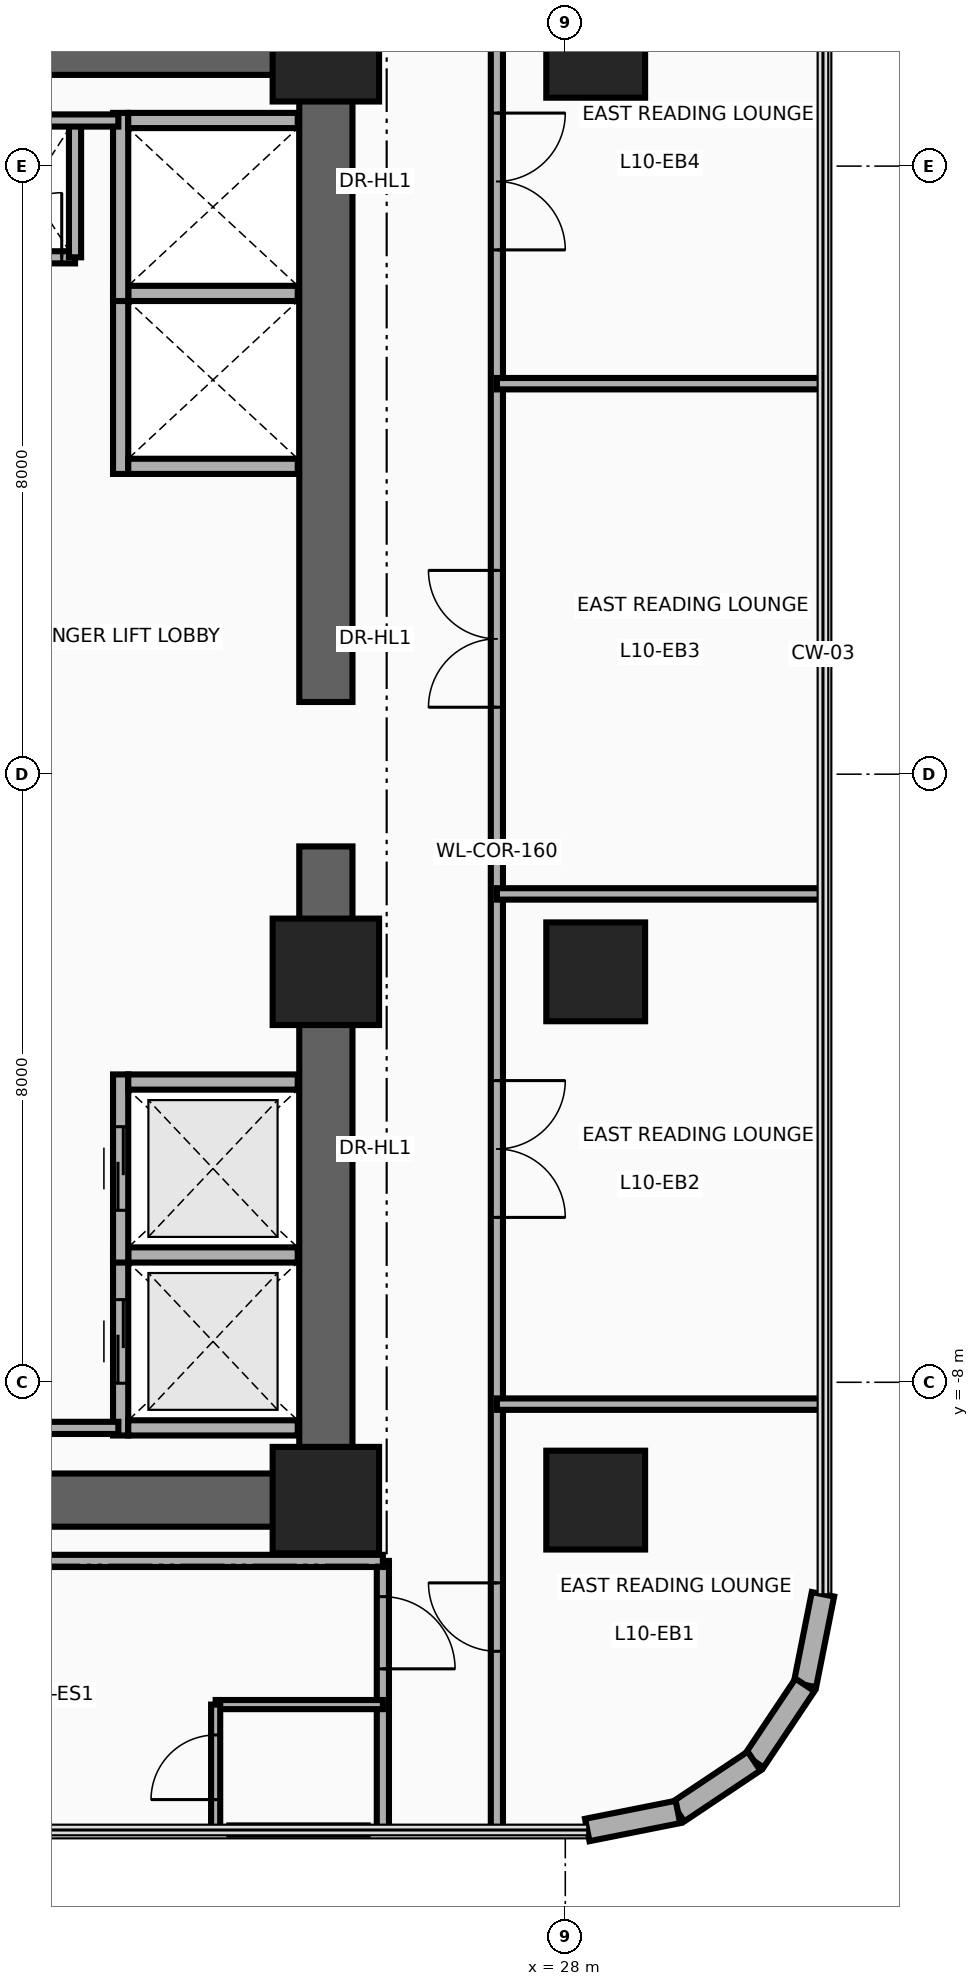
"""IFC4 building model, lengths in metres.
Left out: names, types, materials, properties, quantities, classifications, styles, units other than length and angle.
Written with IfcOpenShell. Run it as: python <this file> out.ifc"""

import sys

from ifc_helpers import new_model, si_unit, direction, frame, frame_2d, origin, origin_2d, place, context, subcontext, project, spatial, rectangle, circle, extrude, source, transform, mapped, element, fill, save


model = new_model("IFC4")
c1 = context("Model", 3, precision=1e-05, world=origin(), true_north=direction((0.0, 1.0)))
c2 = subcontext(c1, "Body", "Model", "MODEL_VIEW")
j1 = project(units=[si_unit("LENGTHUNIT", "METRE"), si_unit("PLANEANGLEUNIT", "RADIAN")], contexts=[c1])
p1 = place(None, origin())
s1 = spatial("IfcSite", under=j1, at=p1, CompositionType="ELEMENT")
p2 = place(p1, origin())
s2 = spatial("IfcBuilding", under=s1, at=p2, CompositionType="ELEMENT")
p3 = place(p2, frame((0.0, 0.0, 44.5)))
s3 = spatial("IfcBuildingStorey", under=s2, at=p3, CompositionType="ELEMENT", Elevation=44.5)
for number, where, z_axis, x_axis in (
    (1, (24.85, -9.9, 0.0), (0.0, 0.0, 1.0), (0.0, 1.0, 0.0)),
    (2, (24.85, 0.95, 0.0), (0.0, 0.0, 1.0), (0.0, 1.0, 0.0)),
):
    element("IfcWall", number, at=place(p3, frame(where, z_axis=z_axis, x_axis=x_axis)), inside=s3, PredefinedType="SHEAR", context=c2, shape_type="SweptSolid", body=[
        extrude(rectangle(XDim=8.95, YDim=0.7, at=frame_2d((4.475, 0.0))), origin(), (0.0, 0.0, 1.0), 3.46),
    ])
for number, where, z_axis, x_axis in (
    (3, (15.85, 9.55, 0.0), (0.0, 0.0, 1.0), (1.0, 0.0, 0.0)),
    (4, (15.85, -9.55, 0.0), (0.0, 0.0, 1.0), (1.0, 0.0, 0.0)),
):
    element("IfcWall", number, at=place(p3, frame(where, z_axis=z_axis, x_axis=x_axis)), inside=s3, PredefinedType="SHEAR", context=c2, shape_type="SweptSolid", body=[
        extrude(rectangle(XDim=9.0, YDim=0.7, at=frame_2d((4.5, 0.0))), origin(), (0.0, 0.0, 1.0), 3.46),
    ])
m1 = source(origin(), c2, "Body", "SweptSolid", [
    extrude(rectangle(XDim=1.4, YDim=1.4, at=origin_2d()), origin(), (0.0, 0.0, 1.0), 3.7),
])
p4 = place(p3, frame((24.85, -9.55, 0.0), z_axis=(0.0, 0.0, 1.0), x_axis=(1.0, 0.0, 0.0)))
e5 = element("IfcColumn", 5, at=p4, inside=s3, PredefinedType="COLUMN", context=c2, shape_type="MappedRepresentation", body=[
    mapped(m1, transform((0.0, 0.0, 0.0), x_axis=(1.0, 0.0, 0.0), y_axis=(0.0, 1.0, 0.0), z_axis=(0.0, 0.0, 1.0), scale=1.0)),
])
m2 = source(origin(), c2, "Body", "SweptSolid", [
    extrude(circle(Radius=0.65, at=origin_2d()), origin(), (0.0, 0.0, 1.0), 3.7),
])
p5 = place(p3, frame((28.4, -9.55, 0.0), z_axis=(0.0, 0.0, 1.0), x_axis=(1.0, 0.0, 0.0)))
e6 = element("IfcColumn", 6, at=p5, inside=s3, PredefinedType="COLUMN", context=c2, shape_type="MappedRepresentation", body=[
    mapped(m2, transform((0.0, 0.0, 0.0), x_axis=(1.0, 0.0, 0.0), y_axis=(0.0, 1.0, 0.0), z_axis=(0.0, 0.0, 1.0), scale=1.0)),
])
p6 = place(p3, frame((24.85, -2.6, 0.0), z_axis=(0.0, 0.0, 1.0), x_axis=(1.0, 0.0, 0.0)))
e7 = element("IfcColumn", 7, at=p6, inside=s3, PredefinedType="COLUMN", context=c2, shape_type="MappedRepresentation", body=[
    mapped(m1, transform((0.0, 0.0, 0.0), x_axis=(1.0, 0.0, 0.0), y_axis=(0.0, 1.0, 0.0), z_axis=(0.0, 0.0, 1.0), scale=1.0)),
])
p7 = place(p3, frame((28.4, -2.6, 0.0), z_axis=(0.0, 0.0, 1.0), x_axis=(1.0, 0.0, 0.0)))
e8 = element("IfcColumn", 8, at=p7, inside=s3, PredefinedType="COLUMN", context=c2, shape_type="MappedRepresentation", body=[
    mapped(m2, transform((0.0, 0.0, 0.0), x_axis=(1.0, 0.0, 0.0), y_axis=(0.0, 1.0, 0.0), z_axis=(0.0, 0.0, 1.0), scale=1.0)),
])
p8 = place(p3, frame((24.85, 9.55, 0.0), z_axis=(0.0, 0.0, 1.0), x_axis=(1.0, 0.0, 0.0)))
e9 = element("IfcColumn", 9, at=p8, inside=s3, PredefinedType="COLUMN", context=c2, shape_type="MappedRepresentation", body=[
    mapped(m1, transform((0.0, 0.0, 0.0), x_axis=(1.0, 0.0, 0.0), y_axis=(0.0, 1.0, 0.0), z_axis=(0.0, 0.0, 1.0), scale=1.0)),
])
p9 = place(p3, frame((28.4, 9.55, 0.0), z_axis=(0.0, 0.0, 1.0), x_axis=(1.0, 0.0, 0.0)))
e10 = element("IfcColumn", 10, at=p9, inside=s3, PredefinedType="COLUMN", context=c2, shape_type="MappedRepresentation", body=[
    mapped(m2, transform((0.0, 0.0, 0.0), x_axis=(1.0, 0.0, 0.0), y_axis=(0.0, 1.0, 0.0), z_axis=(0.0, 0.0, 1.0), scale=1.0)),
])
p10 = place(p3, frame((31.39, -10.789, 0.0), z_axis=(0.0, 0.0, 1.0), x_axis=(-0.194996050505, -0.980804027463, 0.0)))
e11 = element("IfcWall", 11, at=p10, inside=s3, PredefinedType="SOLIDWALL", context=c2, shape_type="SweptSolid", body=[
    extrude(rectangle(XDim=1.216, YDim=0.3, at=frame_2d((0.608, 0.0))), origin(), (0.0, 0.0, 1.0), 3.46),
])
for number, where, z_axis, x_axis in (
    (12, (31.153, -11.982, 0.0), (0.0, 0.0, 1.0), (-0.556, -0.831, 0.0)),
    (13, (30.483, -12.983, 0.0), (0.0, 0.0, 1.0), (-0.831, -0.556, 0.0)),
):
    element("IfcWall", number, at=place(p3, frame(where, z_axis=z_axis, x_axis=x_axis)), inside=s3, PredefinedType="SOLIDWALL", context=c2, shape_type="SweptSolid", body=[
        extrude(rectangle(XDim=1.205, YDim=0.3, at=frame_2d((0.603, 0.0))), origin(), (0.0, 0.0, 1.0), 3.46),
    ])
p11 = place(p3, frame((29.482, -13.653, 0.0), z_axis=(0.0, 0.0, 1.0), x_axis=(-0.980804027463, -0.194996050505, 0.0)))
e14 = element("IfcWall", 14, at=p11, inside=s3, PredefinedType="SOLIDWALL", context=c2, shape_type="SweptSolid", body=[
    extrude(rectangle(XDim=1.216, YDim=0.3, at=frame_2d((0.608, 0.0))), origin(), (0.0, 0.0, 1.0), 3.46),
])
p12 = place(p3, frame((22.15, -8.7, 0.0), z_axis=(0.0, 0.0, 1.0), x_axis=(0.0, 1.0, 0.0)))
e15 = element("IfcWall", 15, at=p12, inside=s3, PredefinedType="MOVABLE", context=c2, shape_type="SweptSolid", body=[
    extrude(rectangle(XDim=2.475, YDim=0.2, at=frame_2d((1.237, 0.0))), origin(), (0.0, 0.0, 1.0), 3.46),
])
p13 = place(p12, frame((0.688, 0.0, 0.0)))
e16 = element("IfcOpeningElement", 16, at=p13, cuts=e15, PredefinedType="OPENING", context=c2, shape_type="SweptSolid", body=[
    extrude(rectangle(XDim=1.1, YDim=2.1, at=frame_2d((0.55, 1.05))), frame((0.0, 0.115, 0.0), z_axis=(0.0, -1.0, 0.0), x_axis=(1.0, 0.0, 0.0)), (0.0, 0.0, 1.0), 0.23),
])
for number, where, z_axis, x_axis in (
    (17, (22.25, -8.6, 0.0), (0.0, 0.0, 1.0), (1.0, 0.0, 0.0)),
    (18, (22.25, -6.325, 0.0), (0.0, 0.0, 1.0), (1.0, 0.0, 0.0)),
):
    element("IfcWall", number, at=place(p3, frame(where, z_axis=z_axis, x_axis=x_axis)), inside=s3, PredefinedType="MOVABLE", context=c2, shape_type="SweptSolid", body=[
        extrude(rectangle(XDim=2.23, YDim=0.2, at=frame_2d((1.115, 0.0))), origin(), (0.0, 0.0, 1.0), 3.46),
    ])
p14 = place(p3, frame((22.15, -6.425, 0.0), z_axis=(0.0, 0.0, 1.0), x_axis=(0.0, 1.0, 0.0)))
e19 = element("IfcWall", 19, at=p14, inside=s3, PredefinedType="MOVABLE", context=c2, shape_type="SweptSolid", body=[
    extrude(rectangle(XDim=2.475, YDim=0.2, at=frame_2d((1.238, 0.0))), origin(), (0.0, 0.0, 1.0), 3.46),
])
p15 = place(p14, frame((0.688, 0.0, 0.0)))
e20 = element("IfcOpeningElement", 20, at=p15, cuts=e19, PredefinedType="OPENING", context=c2, shape_type="SweptSolid", body=[
    extrude(rectangle(XDim=1.1, YDim=2.1, at=frame_2d((0.55, 1.05))), frame((0.0, 0.115, 0.0), z_axis=(0.0, -1.0, 0.0), x_axis=(1.0, 0.0, 0.0)), (0.0, 0.0, 1.0), 0.23),
])
p16 = place(p3, frame((22.25, -4.05, 0.0), z_axis=(0.0, 0.0, 1.0), x_axis=(1.0, 0.0, 0.0)))
e21 = element("IfcWall", 21, at=p16, inside=s3, PredefinedType="MOVABLE", context=c2, shape_type="SweptSolid", body=[
    extrude(rectangle(XDim=2.23, YDim=0.2, at=frame_2d((1.115, 0.0))), origin(), (0.0, 0.0, 1.0), 3.46),
])
p17 = place(p3, frame((22.15, 3.95, 0.0), z_axis=(0.0, 0.0, 1.0), x_axis=(0.0, 1.0, 0.0)))
e22 = element("IfcWall", 22, at=p17, inside=s3, PredefinedType="MOVABLE", context=c2, shape_type="SweptSolid", body=[
    extrude(rectangle(XDim=2.475, YDim=0.2, at=frame_2d((1.238, 0.0))), origin(), (0.0, 0.0, 1.0), 3.46),
])
for number, where, z_axis, x_axis in (
    (23, (22.25, 4.05, 0.0), (0.0, 0.0, 1.0), (1.0, 0.0, 0.0)),
    (24, (22.25, 6.325, 0.0), (0.0, 0.0, 1.0), (1.0, 0.0, 0.0)),
):
    element("IfcWall", number, at=place(p3, frame(where, z_axis=z_axis, x_axis=x_axis)), inside=s3, PredefinedType="MOVABLE", context=c2, shape_type="SweptSolid", body=[
        extrude(rectangle(XDim=2.23, YDim=0.2, at=frame_2d((1.115, 0.0))), origin(), (0.0, 0.0, 1.0), 2.245),
    ])
p18 = place(p3, frame((22.15, 6.225, 0.0), z_axis=(0.0, 0.0, 1.0), x_axis=(0.0, 1.0, 0.0)))
e25 = element("IfcWall", 25, at=p18, inside=s3, PredefinedType="MOVABLE", context=c2, shape_type="SweptSolid", body=[
    extrude(rectangle(XDim=2.475, YDim=0.2, at=frame_2d((1.237, 0.0))), origin(), (0.0, 0.0, 1.0), 3.46),
])
p19 = place(p3, frame((22.25, 8.6, 0.0), z_axis=(0.0, 0.0, 1.0), x_axis=(1.0, 0.0, 0.0)))
e26 = element("IfcWall", 26, at=p19, inside=s3, PredefinedType="MOVABLE", context=c2, shape_type="SweptSolid", body=[
    extrude(rectangle(XDim=2.23, YDim=0.2, at=frame_2d((1.115, 0.0))), origin(), (0.0, 0.0, 1.0), 2.245),
])
p20 = place(p3, frame((20.35, 6.8, 0.0), z_axis=(0.0, 0.0, 1.0), x_axis=(1.0, 0.0, 0.0)))
e27 = element("IfcWall", 27, at=p20, inside=s3, PredefinedType="PARTITIONING", context=c2, shape_type="SweptSolid", body=[
    extrude(rectangle(XDim=1.2, YDim=0.16, at=frame_2d((0.6, 0.0))), origin(), (0.0, 0.0, 1.0), 3.46),
])
p21 = place(p20, frame((0.175, 0.0, 0.0)))
e28 = element("IfcOpeningElement", 28, at=p21, cuts=e27, PredefinedType="OPENING", context=c2, shape_type="SweptSolid", body=[
    extrude(rectangle(XDim=0.85, YDim=2.05, at=frame_2d((0.425, 1.025))), frame((0.0, 0.095, 0.0), z_axis=(0.0, -1.0, 0.0), x_axis=(1.0, 0.0, 0.0)), (0.0, 0.0, 1.0), 0.19),
])
p22 = place(p3, frame((21.55, 6.8, 0.0), z_axis=(0.0, 0.0, 1.0), x_axis=(0.0, 1.0, 0.0)))
e29 = element("IfcWall", 29, at=p22, inside=s3, PredefinedType="PARTITIONING", context=c2, shape_type="SweptSolid", body=[
    extrude(rectangle(XDim=1.8, YDim=0.16, at=frame_2d((0.9, 0.0))), origin(), (0.0, 0.0, 1.0), 3.46),
])
for number, where, z_axis, x_axis in (
    (30, (20.3, -8.6, 0.0), (0.0, 0.0, 1.0), (1.0, 0.0, 0.0)),
    (31, (20.3, 8.6, 0.0), (0.0, 0.0, 1.0), (1.0, 0.0, 0.0)),
):
    element("IfcWall", number, at=place(p3, frame(where, z_axis=z_axis, x_axis=x_axis)), inside=s3, PredefinedType="PARTITIONING", context=c2, shape_type="SweptSolid", body=[
        extrude(rectangle(XDim=1.82, YDim=0.16, at=frame_2d((0.91, 0.0))), origin(), (0.0, 0.0, 1.0), 3.46),
    ])
p23 = place(p3, frame((25.6, -13.89, 0.0), z_axis=(0.0, 0.0, 1.0), x_axis=(0.0, 1.0, 0.0)))
e32 = element("IfcWall", 32, at=p23, inside=s3, PredefinedType="PARTITIONING", context=c2, shape_type="SweptSolid", body=[
    extrude(rectangle(XDim=3.54, YDim=0.16, at=frame_2d((1.77, 0.0))), origin(), (0.0, 0.0, 1.0), 3.46),
])
p24 = place(p23, frame((2.12, 0.0, 0.0)))
e33 = element("IfcOpeningElement", 33, at=p24, cuts=e32, PredefinedType="OPENING", context=c2, shape_type="SweptSolid", body=[
    extrude(rectangle(XDim=0.95, YDim=2.15, at=frame_2d((0.475, 1.075))), frame((0.0, 0.095, 0.0), z_axis=(0.0, -1.0, 0.0), x_axis=(1.0, 0.0, 0.0)), (0.0, 0.0, 1.0), 0.19),
])
p25 = place(p3, frame((13.41, -10.35, 0.0), z_axis=(0.0, 0.0, 1.0), x_axis=(1.0, 0.0, 0.0)))
e34 = element("IfcWall", 34, at=p25, inside=s3, PredefinedType="PARTITIONING", context=c2, shape_type="SweptSolid", body=[
    extrude(rectangle(XDim=12.19, YDim=0.16, at=frame_2d((6.095, 0.0))), origin(), (0.0, 0.0, 1.0), 3.46),
])
p26 = place(p3, frame((23.4, -12.24, 0.0), z_axis=(0.0, 0.0, 1.0), x_axis=(1.0, 0.0, 0.0)))
e35 = element("IfcWall", 35, at=p26, inside=s3, PredefinedType="PARTITIONING", context=c2, shape_type="SweptSolid", body=[
    extrude(rectangle(XDim=2.2, YDim=0.12, at=frame_2d((1.1, 0.0))), origin(), (0.0, 0.0, 1.0), 3.46),
])
p27 = place(p3, frame((23.4, -13.89, 0.0), z_axis=(0.0, 0.0, 1.0), x_axis=(0.0, 1.0, 0.0)))
e36 = element("IfcWall", 36, at=p27, inside=s3, PredefinedType="PARTITIONING", context=c2, shape_type="SweptSolid", body=[
    extrude(rectangle(XDim=1.65, YDim=0.12, at=frame_2d((0.825, 0.0))), origin(), (0.0, 0.0, 1.0), 3.46),
])
p28 = place(p27, frame((0.4, 0.0, 0.0)))
e37 = element("IfcOpeningElement", 37, at=p28, cuts=e36, PredefinedType="OPENING", context=c2, shape_type="SweptSolid", body=[
    extrude(rectangle(XDim=0.85, YDim=2.1, at=frame_2d((0.425, 1.05))), frame((0.0, 0.075, 0.0), z_axis=(0.0, -1.0, 0.0), x_axis=(1.0, 0.0, 0.0)), (0.0, 0.0, 1.0), 0.15),
])
p29 = place(p3, frame((23.58, -13.89, 0.0), z_axis=(0.0, 0.0, 1.0), x_axis=(1.0, 0.0, 0.0)))
e38 = element("IfcWall", 38, at=p29, inside=s3, PredefinedType="PARTITIONING", context=c2, shape_type="SweptSolid", body=[
    extrude(rectangle(XDim=1.82, YDim=0.12, at=frame_2d((0.91, 0.0))), origin(), (0.0, 0.0, 1.0), 3.46),
])
p30 = place(p3, frame((27.1, -13.89, 0.0), z_axis=(0.0, 0.0, 1.0), x_axis=(0.0, 1.0, 0.0)))
e39 = element("IfcWall", 39, at=p30, inside=s3, PredefinedType="PARTITIONING", context=c2, shape_type="SweptSolid", body=[
    extrude(rectangle(XDim=25.74, YDim=0.16, at=frame_2d((12.87, 0.0))), origin(), (0.0, 0.0, 1.0), 2.583),
])
p31 = place(p30, frame((2.351, 0.0, 0.0)))
e40 = element("IfcOpeningElement", 40, at=p31, cuts=e39, PredefinedType="OPENING", context=c2, shape_type="SweptSolid", body=[
    extrude(rectangle(XDim=0.9, YDim=2.1, at=frame_2d((0.45, 1.05))), frame((0.0, 0.095, 0.0), z_axis=(0.0, -1.0, 0.0), x_axis=(1.0, 0.0, 0.0)), (0.0, 0.0, 1.0), 0.19),
])
p32 = place(p30, frame((8.059, 0.0, 0.0)))
e41 = element("IfcOpeningElement", 41, at=p32, cuts=e39, PredefinedType="OPENING", context=c2, shape_type="SweptSolid", body=[
    extrude(rectangle(XDim=1.8, YDim=2.15, at=frame_2d((0.9, 1.075))), frame((0.0, 0.095, 0.0), z_axis=(0.0, -1.0, 0.0), x_axis=(1.0, 0.0, 0.0)), (0.0, 0.0, 1.0), 0.19),
])
p33 = place(p30, frame((14.771, 0.0, 0.0)))
e42 = element("IfcOpeningElement", 42, at=p33, cuts=e39, PredefinedType="OPENING", context=c2, shape_type="SweptSolid", body=[
    extrude(rectangle(XDim=1.8, YDim=2.15, at=frame_2d((0.9, 1.075))), frame((0.0, 0.095, 0.0), z_axis=(0.0, -1.0, 0.0), x_axis=(1.0, 0.0, 0.0)), (0.0, 0.0, 1.0), 0.19),
])
p34 = place(p30, frame((20.788, 0.0, 0.0)))
e43 = element("IfcOpeningElement", 43, at=p34, cuts=e39, PredefinedType="OPENING", context=c2, shape_type="SweptSolid", body=[
    extrude(rectangle(XDim=1.8, YDim=2.15, at=frame_2d((0.9, 1.075))), frame((0.0, 0.095, 0.0), z_axis=(0.0, -1.0, 0.0), x_axis=(1.0, 0.0, 0.0)), (0.0, 0.0, 1.0), 0.19),
])
for number, where, z_axis, x_axis in (
    (44, (27.1, -8.288, 0.0), (0.0, 0.0, 1.0), (1.0, 0.0, 0.0)),
    (45, (27.1, -1.575, 0.0), (0.0, 0.0, 1.0), (1.0, 0.0, 0.0)),
    (46, (27.1, 5.137, 0.0), (0.0, 0.0, 1.0), (1.0, 0.0, 0.0)),
):
    element("IfcWall", number, at=place(p3, frame(where, z_axis=z_axis, x_axis=x_axis)), inside=s3, PredefinedType="PARTITIONING", context=c2, shape_type="SweptSolid", body=[
        extrude(rectangle(XDim=4.29, YDim=0.15, at=frame_2d((2.145, 0.0))), origin(), (0.0, 0.0, 1.0), 2.896),
    ])
p35 = place(p13, origin())
e47 = element("IfcDoor", 47, at=p35, inside=s3, OperationType="DOUBLE_DOOR_SLIDING", PredefinedType="DOOR", context=c2, shape_type="SweptSolid", body=[
    extrude(rectangle(XDim=1.1, YDim=2.1, at=frame_2d((0.55, 1.05))), frame((0.0, 0.025, 0.0), z_axis=(0.0, -1.0, 0.0), x_axis=(1.0, 0.0, 0.0)), (0.0, 0.0, 1.0), 0.05),
])
fill(e16, e47)
p36 = place(p15, origin())
e48 = element("IfcDoor", 48, at=p36, inside=s3, OperationType="DOUBLE_DOOR_SLIDING", PredefinedType="DOOR", context=c2, shape_type="SweptSolid", body=[
    extrude(rectangle(XDim=1.1, YDim=2.1, at=frame_2d((0.55, 1.05))), frame((0.0, 0.025, 0.0), z_axis=(0.0, -1.0, 0.0), x_axis=(1.0, 0.0, 0.0)), (0.0, 0.0, 1.0), 0.05),
])
fill(e20, e48)
p37 = place(p21, origin())
e49 = element("IfcDoor", 49, at=p37, inside=s3, OperationType="SINGLE_SWING_LEFT", PredefinedType="DOOR", context=c2, shape_type="SweptSolid", body=[
    extrude(rectangle(XDim=0.85, YDim=2.05, at=frame_2d((0.425, 1.025))), frame((0.0, 0.025, 0.0), z_axis=(0.0, -1.0, 0.0), x_axis=(1.0, 0.0, 0.0)), (0.0, 0.0, 1.0), 0.05),
])
fill(e28, e49)
p38 = place(p24, frame((0.95, 0.0, 0.0), z_axis=(0.0, 0.0, 1.0), x_axis=(-1.0, 0.0, 0.0)))
e50 = element("IfcDoor", 50, at=p38, inside=s3, OperationType="SINGLE_SWING_LEFT", PredefinedType="DOOR", context=c2, shape_type="SweptSolid", body=[
    extrude(rectangle(XDim=0.95, YDim=2.15, at=frame_2d((0.475, 1.075))), frame((0.0, 0.025, 0.0), z_axis=(0.0, -1.0, 0.0), x_axis=(1.0, 0.0, 0.0)), (0.0, 0.0, 1.0), 0.05),
])
fill(e33, e50)
p39 = place(p28, origin())
e51 = element("IfcDoor", 51, at=p39, inside=s3, OperationType="SINGLE_SWING_RIGHT", PredefinedType="DOOR", context=c2, shape_type="SweptSolid", body=[
    extrude(rectangle(XDim=0.85, YDim=2.1, at=frame_2d((0.425, 1.05))), frame((0.0, 0.025, 0.0), z_axis=(0.0, -1.0, 0.0), x_axis=(1.0, 0.0, 0.0)), (0.0, 0.0, 1.0), 0.05),
])
fill(e37, e51)
p40 = place(p31, origin())
e52 = element("IfcDoor", 52, at=p40, inside=s3, OperationType="SINGLE_SWING_RIGHT", PredefinedType="DOOR", context=c2, shape_type="SweptSolid", body=[
    extrude(rectangle(XDim=0.9, YDim=2.1, at=frame_2d((0.45, 1.05))), frame((0.0, 0.025, 0.0), z_axis=(0.0, -1.0, 0.0), x_axis=(1.0, 0.0, 0.0)), (0.0, 0.0, 1.0), 0.05),
])
fill(e40, e52)
p41 = place(p32, frame((1.8, 0.0, 0.0), z_axis=(0.0, 0.0, 1.0), x_axis=(-1.0, 0.0, 0.0)))
e53 = element("IfcDoor", 53, at=p41, inside=s3, OperationType="DOUBLE_DOOR_SINGLE_SWING", PredefinedType="DOOR", context=c2, shape_type="SweptSolid", body=[
    extrude(rectangle(XDim=1.8, YDim=2.15, at=frame_2d((0.9, 1.075))), frame((0.0, 0.025, 0.0), z_axis=(0.0, -1.0, 0.0), x_axis=(1.0, 0.0, 0.0)), (0.0, 0.0, 1.0), 0.05),
])
fill(e41, e53)
p42 = place(p33, origin())
e54 = element("IfcDoor", 54, at=p42, inside=s3, OperationType="DOUBLE_DOOR_SINGLE_SWING", PredefinedType="DOOR", context=c2, shape_type="SweptSolid", body=[
    extrude(rectangle(XDim=1.8, YDim=2.15, at=frame_2d((0.9, 1.075))), frame((0.0, 0.025, 0.0), z_axis=(0.0, -1.0, 0.0), x_axis=(1.0, 0.0, 0.0)), (0.0, 0.0, 1.0), 0.05),
])
fill(e42, e54)
p43 = place(p34, frame((1.8, 0.0, 0.0), z_axis=(0.0, 0.0, 1.0), x_axis=(-1.0, 0.0, 0.0)))
e55 = element("IfcDoor", 55, at=p43, inside=s3, OperationType="DOUBLE_DOOR_SINGLE_SWING", PredefinedType="DOOR", context=c2, shape_type="SweptSolid", body=[
    extrude(rectangle(XDim=1.8, YDim=2.15, at=frame_2d((0.9, 1.075))), frame((0.0, 0.025, 0.0), z_axis=(0.0, -1.0, 0.0), x_axis=(1.0, 0.0, 0.0)), (0.0, 0.0, 1.0), 0.05),
])
fill(e43, e55)
save(model, sys.argv[1])
